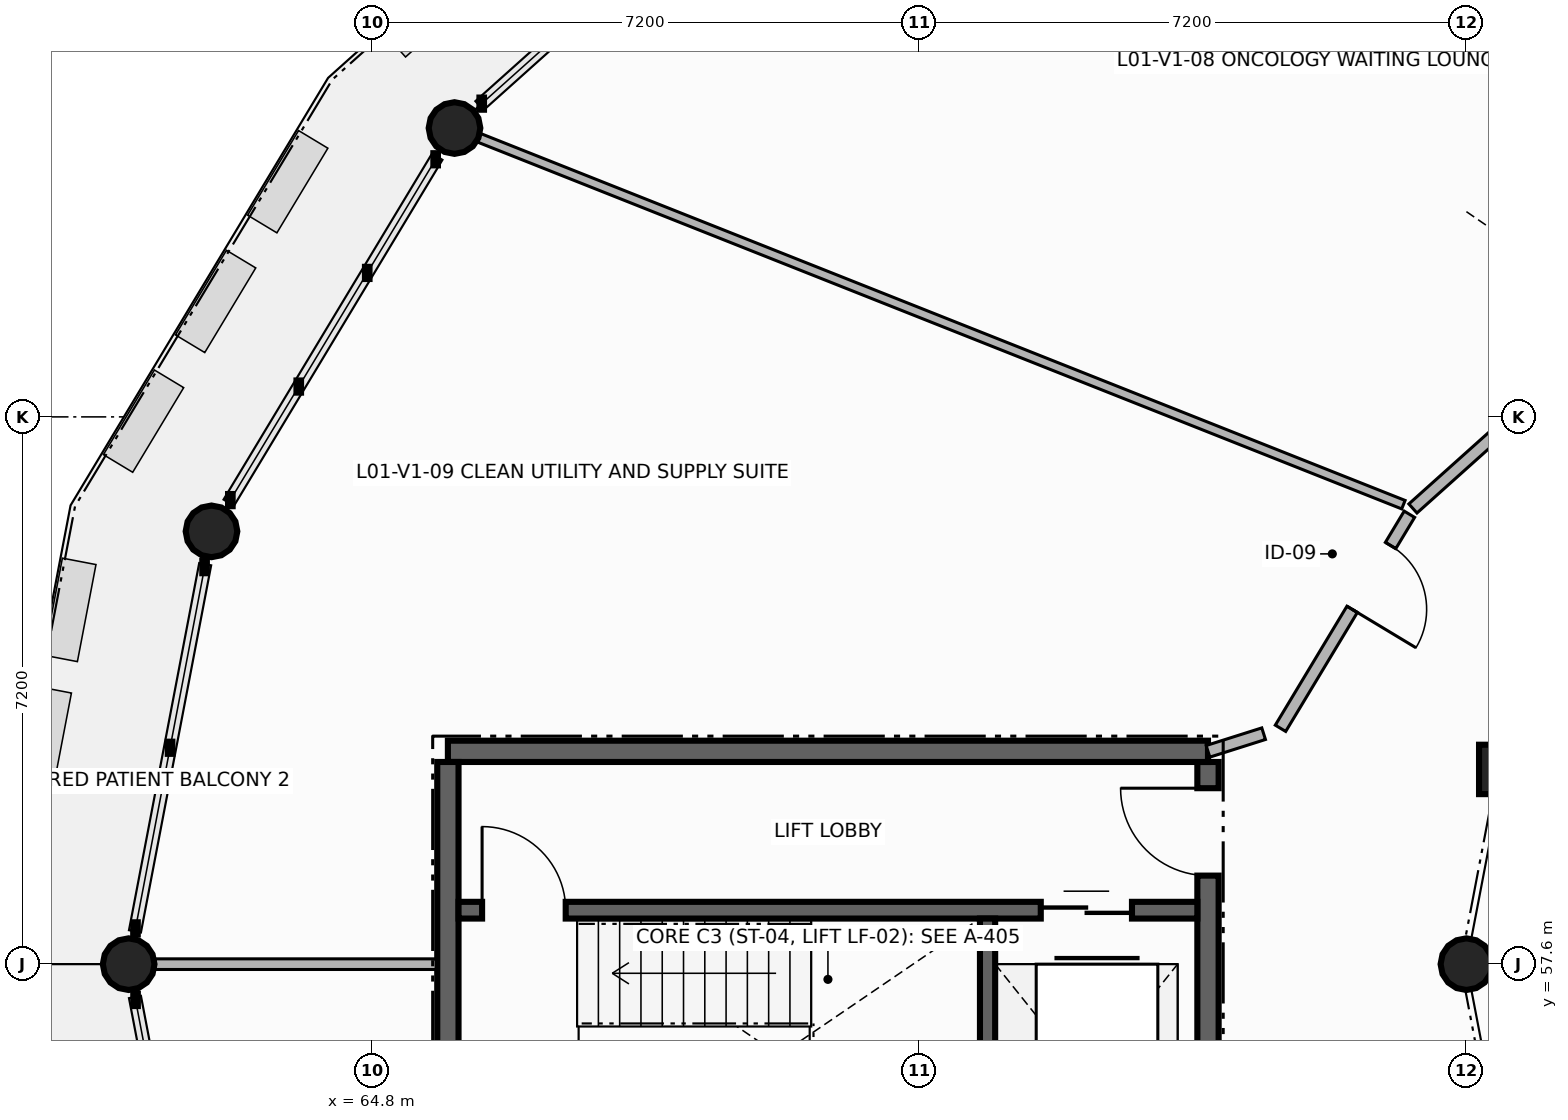
"""IFC4 building model, lengths in metres.
Left out: names, types, materials, properties, quantities, classifications, styles, units other than length and angle.
Written with IfcOpenShell. Run it as: python <this file> out.ifc"""

import sys

from ifc_helpers import new_model, si_unit, direction, frame, frame_2d, origin, origin_2d, place, context, subcontext, project, spatial, rectangle, circle, extrude, element, fill, save


model = new_model("IFC4")
c1 = context("Model", 3, precision=1e-05, world=origin(), true_north=direction((0.0, 1.0)))
c2 = subcontext(c1, "Body", "Model", "MODEL_VIEW")
j1 = project(units=[si_unit("LENGTHUNIT", "METRE"), si_unit("PLANEANGLEUNIT", "RADIAN")], contexts=[c1])
p1 = place(None, origin())
s1 = spatial("IfcSite", under=j1, at=p1, CompositionType="ELEMENT")
p2 = place(p1, origin())
s2 = spatial("IfcBuilding", under=s1, at=p2, CompositionType="ELEMENT")
p3 = place(p2, frame((0.0, 0.0, 4.5)))
s3 = spatial("IfcBuildingStorey", under=s2, at=p3, CompositionType="ELEMENT", Elevation=4.5)
for number, where, z_axis, x_axis in (
    (1, (65.887, 68.6, 0.0), (0.0, 0.0, 1.0), (1.0, 0.0, 0.0)),
    (2, (62.69, 63.294, 0.0), (0.0, 0.0, 1.0), (1.0, 0.0, 0.0)),
):
    element("IfcColumn", number, at=place(p3, frame(where, z_axis=z_axis, x_axis=x_axis)), inside=s3, PredefinedType="COLUMN", context=c2, shape_type="SweptSolid", body=[
        extrude(circle(Radius=0.34, at=origin_2d()), origin(), (0.0, 0.0, 1.0), 3.61),
    ])
p4 = place(p3, frame((79.691, 60.162, 0.0), z_axis=(0.0, 0.0, 1.0), x_axis=(1.0, 0.0, 0.0)))
e3 = element("IfcColumn", 3, at=p4, inside=s3, PredefinedType="COLUMN", context=c2, shape_type="SweptSolid", body=[
    extrude(rectangle(XDim=0.65, YDim=0.65, at=origin_2d()), origin(), (0.0, 0.0, 1.0), 3.61),
])
for number, where, z_axis, x_axis in (
    (4, (61.6, 57.6, 0.0), (0.0, 0.0, 1.0), (1.0, 0.0, 0.0)),
    (5, (79.2, 57.6, 0.0), (0.0, 0.0, 1.0), (1.0, 0.0, 0.0)),
):
    element("IfcColumn", number, at=place(p3, frame(where, z_axis=z_axis, x_axis=x_axis)), inside=s3, PredefinedType="COLUMN", context=c2, shape_type="SweptSolid", body=[
        extrude(circle(Radius=0.34, at=origin_2d()), origin(), (0.0, 0.0, 1.0), 3.61),
    ])
p5 = place(p3, frame((75.8, 54.54, 0.0), z_axis=(0.0, 0.0, 1.0), x_axis=(0.0, 1.0, 0.0)))
e6 = element("IfcWall", 6, at=p5, inside=s3, PredefinedType="SHEAR", context=c2, shape_type="SweptSolid", body=[
    extrude(rectangle(XDim=5.72, YDim=0.28, at=frame_2d((2.86, 0.0))), origin(), (0.0, 0.0, 1.0), 3.61),
])
p6 = place(p5, frame((4.225, 0.0, 0.0)))
e7 = element("IfcOpeningElement", 7, at=p6, cuts=e6, PredefinedType="OPENING", context=c2, shape_type="SweptSolid", body=[
    extrude(rectangle(XDim=1.15, YDim=2.2, at=frame_2d((0.575, 1.1))), frame((0.0, 0.15, 0.0), z_axis=(0.0, -1.0, 0.0), x_axis=(1.0, 0.0, 0.0)), (0.0, 0.0, 1.0), 0.3),
])
p7 = place(p3, frame((75.8, 60.4, 0.0), z_axis=(0.0, 0.0, 1.0), x_axis=(-1.0, 0.0, 0.0)))
e8 = element("IfcWall", 8, at=p7, inside=s3, PredefinedType="SHEAR", context=c2, shape_type="SweptSolid", body=[
    extrude(rectangle(XDim=10.0, YDim=0.28, at=frame_2d((5.0, 0.0))), origin(), (0.0, 0.0, 1.0), 3.61),
])
p8 = place(p3, frame((65.8, 60.26, 0.0), z_axis=(0.0, 0.0, 1.0), x_axis=(0.0, -1.0, 0.0)))
e9 = element("IfcWall", 9, at=p8, inside=s3, PredefinedType="SHEAR", context=c2, shape_type="SweptSolid", body=[
    extrude(rectangle(XDim=5.72, YDim=0.28, at=frame_2d((2.86, 0.0))), origin(), (0.0, 0.0, 1.0), 3.61),
])
p9 = place(p3, frame((65.94, 58.31, 0.0), z_axis=(0.0, 0.0, 1.0), x_axis=(1.0, 0.0, 0.0)))
e10 = element("IfcWall", 10, at=p9, inside=s3, PredefinedType="SHEAR", context=c2, shape_type="SweptSolid", body=[
    extrude(rectangle(XDim=9.72, YDim=0.22, at=frame_2d((4.86, 0.0))), origin(), (0.0, 0.0, 1.0), 3.61),
])
p10 = place(p9, frame((0.31, 0.0, 0.0)))
e11 = element("IfcOpeningElement", 11, at=p10, cuts=e10, PredefinedType="OPENING", context=c2, shape_type="SweptSolid", body=[
    extrude(rectangle(XDim=1.1, YDim=2.15, at=frame_2d((0.55, 1.075))), frame((0.0, 0.12, 0.0), z_axis=(0.0, -1.0, 0.0), x_axis=(1.0, 0.0, 0.0)), (0.0, 0.0, 1.0), 0.24),
])
p11 = place(p9, frame((7.66, 0.0, 0.0)))
e12 = element("IfcOpeningElement", 12, at=p11, cuts=e10, PredefinedType="OPENING", context=c2, shape_type="SweptSolid", body=[
    extrude(rectangle(XDim=1.2, YDim=2.2, at=frame_2d((0.6, 1.1))), frame((0.0, 0.12, 0.0), z_axis=(0.0, -1.0, 0.0), x_axis=(1.0, 0.0, 0.0)), (0.0, 0.0, 1.0), 0.24),
])
p12 = place(p3, frame((72.9, 54.54, 0.0), z_axis=(0.0, 0.0, 1.0), x_axis=(0.0, 1.0, 0.0)))
e13 = element("IfcWall", 13, at=p12, inside=s3, PredefinedType="SHEAR", context=c2, shape_type="SweptSolid", body=[
    extrude(rectangle(XDim=3.66, YDim=0.2, at=frame_2d((1.83, 0.0))), origin(), (0.0, 0.0, 1.0), 3.61),
])
p13 = place(p3, frame((84.794, 68.087, 0.0), z_axis=(0.0, 0.0, 1.0), x_axis=(-0.643115997281, 0.765768773221, 0.0)))
e14 = element("IfcWall", 14, at=p13, inside=s3, PredefinedType="PARTITIONING", context=c2, shape_type="SweptSolid", body=[
    extrude(rectangle(XDim=10.836, YDim=0.14, at=frame_2d((5.418, 0.0))), origin(), (0.0, 0.0, 1.0), 2.99),
])
p14 = place(p3, frame((81.259, 66.07, 0.0), z_axis=(0.0, 0.0, 1.0), x_axis=(-0.744840105901, -0.667242996697, 0.0)))
e15 = element("IfcWall", 15, at=p14, inside=s3, PredefinedType="PARTITIONING", context=c2, shape_type="SweptSolid", body=[
    extrude(rectangle(XDim=3.709, YDim=0.16, at=frame_2d((1.855, 0.0))), origin(), (0.0, 0.0, 1.0), 2.99),
])
p15 = place(p3, frame((78.371, 63.645, 0.0), z_axis=(0.0, 0.0, 1.0), x_axis=(-0.929468264861, 0.368902079984, 0.0)))
e16 = element("IfcWall", 16, at=p15, inside=s3, PredefinedType="PARTITIONING", context=c2, shape_type="SweptSolid", body=[
    extrude(rectangle(XDim=13.082, YDim=0.12, at=frame_2d((6.541, 0.0))), origin(), (0.0, 0.0, 1.0), 2.99),
])
p16 = place(p3, frame((65.645, 57.6, 0.0), z_axis=(0.0, 0.0, 1.0), x_axis=(-1.0, 0.0, 0.0)))
e17 = element("IfcWall", 17, at=p16, inside=s3, PredefinedType="PARTITIONING", context=c2, shape_type="SweptSolid", body=[
    extrude(rectangle(XDim=3.695, YDim=0.14, at=frame_2d((1.848, 0.0))), origin(), (0.0, 0.0, 1.0), 2.99),
])
p17 = place(p3, frame((78.45, 63.519, 0.0), z_axis=(0.0, 0.0, 1.0), x_axis=(-0.515914810867, -0.856639893962, 0.0)))
e18 = element("IfcWall", 18, at=p17, inside=s3, PredefinedType="PARTITIONING", context=c2, shape_type="SweptSolid", body=[
    extrude(rectangle(XDim=3.287, YDim=0.16, at=frame_2d((1.644, 0.0))), origin(), (0.0, 0.0, 1.0), 2.99),
])
p18 = place(p17, frame((0.48, 0.0, 0.0)))
e19 = element("IfcOpeningElement", 19, at=p18, cuts=e18, PredefinedType="OPENING", context=c2, shape_type="SweptSolid", body=[
    extrude(rectangle(XDim=0.98, YDim=2.15, at=frame_2d((0.49, 1.075))), frame((0.0, 0.09, 0.0), z_axis=(0.0, -1.0, 0.0), x_axis=(1.0, 0.0, 0.0)), (0.0, 0.0, 1.0), 0.18),
])
p19 = place(p3, frame((76.532, 60.632, 0.0), z_axis=(0.0, 0.0, 1.0), x_axis=(-0.953192648892, -0.302363645463, 0.0)))
e20 = element("IfcWall", 20, at=p19, inside=s3, PredefinedType="PARTITIONING", context=c2, shape_type="SweptSolid", body=[
    extrude(rectangle(XDim=0.768, YDim=0.16, at=frame_2d((0.384, 0.0))), origin(), (0.0, 0.0, 1.0), 2.99),
])
p20 = place(p10, origin())
e21 = element("IfcDoor", 21, at=p20, inside=s3, OperationType="SINGLE_SWING_LEFT", PredefinedType="DOOR", context=c2, shape_type="SweptSolid", body=[
    extrude(rectangle(XDim=1.1, YDim=2.15, at=frame_2d((0.55, 1.075))), frame((0.0, 0.025, 0.0), z_axis=(0.0, -1.0, 0.0), x_axis=(1.0, 0.0, 0.0)), (0.0, 0.0, 1.0), 0.05),
])
fill(e11, e21)
p21 = place(p11, origin())
e22 = element("IfcDoor", 22, at=p21, inside=s3, OperationType="DOUBLE_DOOR_SLIDING", PredefinedType="DOOR", context=c2, shape_type="SweptSolid", body=[
    extrude(rectangle(XDim=1.2, YDim=2.2, at=frame_2d((0.6, 1.1))), frame((0.0, 0.025, 0.0), z_axis=(0.0, -1.0, 0.0), x_axis=(1.0, 0.0, 0.0)), (0.0, 0.0, 1.0), 0.05),
])
fill(e12, e22)
p22 = place(p6, origin())
e23 = element("IfcDoor", 23, at=p22, inside=s3, OperationType="SINGLE_SWING_RIGHT", PredefinedType="DOOR", context=c2, shape_type="SweptSolid", body=[
    extrude(rectangle(XDim=1.15, YDim=2.2, at=frame_2d((0.575, 1.1))), frame((0.0, 0.025, 0.0), z_axis=(0.0, -1.0, 0.0), x_axis=(1.0, 0.0, 0.0)), (0.0, 0.0, 1.0), 0.05),
])
fill(e7, e23)
p23 = place(p18, origin())
e24 = element("IfcDoor", 24, at=p23, inside=s3, OperationType="SINGLE_SWING_RIGHT", PredefinedType="DOOR", context=c2, shape_type="SweptSolid", body=[
    extrude(rectangle(XDim=0.98, YDim=2.15, at=frame_2d((0.49, 1.075))), frame((0.0, 0.025, 0.0), z_axis=(0.0, -1.0, 0.0), x_axis=(1.0, 0.0, 0.0)), (0.0, 0.0, 1.0), 0.05),
])
fill(e19, e24)
save(model, sys.argv[1])
